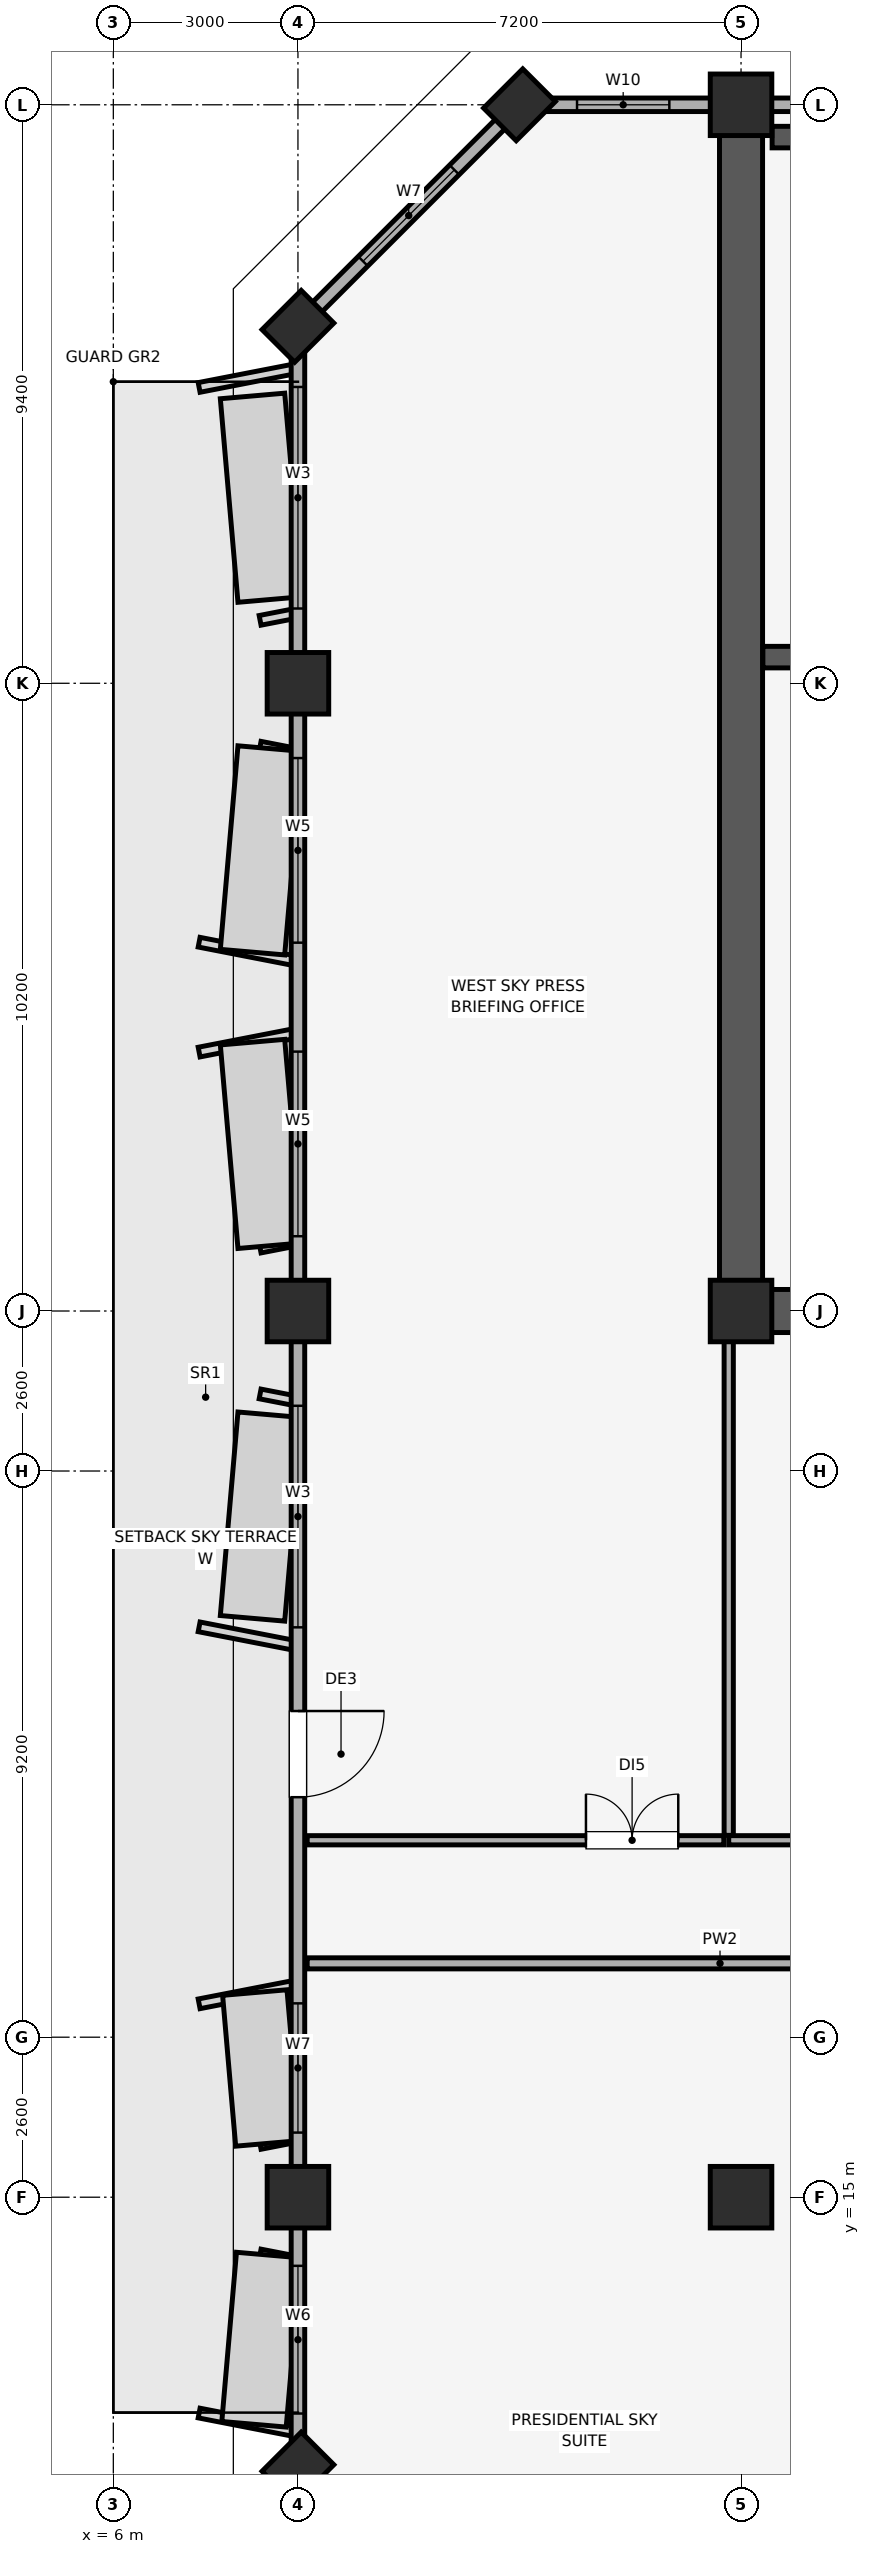
"""IFC4 building model, lengths in metres.
Left out: names, types, materials, properties, quantities, classifications, styles, units other than length and angle.
Written with IfcOpenShell. Run it as: python <this file> out.ifc"""

import sys

from ifc_helpers import new_model, si_unit, direction, frame, frame_2d, origin, origin_2d, place, context, subcontext, project, spatial, rectangle, extrude, element, fill, save


model = new_model("IFC4")
c1 = context("Model", 3, precision=1e-05, world=origin(), true_north=direction((0.0, 1.0)))
c2 = subcontext(c1, "Body", "Model", "MODEL_VIEW")
j1 = project(units=[si_unit("LENGTHUNIT", "METRE"), si_unit("PLANEANGLEUNIT", "RADIAN")], contexts=[c1])
p1 = place(None, origin())
s1 = spatial("IfcSite", under=j1, at=p1, CompositionType="ELEMENT")
p2 = place(p1, origin())
s2 = spatial("IfcBuilding", under=s1, at=p2, CompositionType="ELEMENT")
p3 = place(p2, frame((0.0, 0.0, 285.9)))
s3 = spatial("IfcBuildingStorey", under=s2, at=p3, CompositionType="ELEMENT", Elevation=285.9)
for number, where, z_axis, x_axis in (
    (1, (9.0, 15.0, 0.0), (0.0, 0.0, 1.0), (1.0, 0.0, 0.0)),
    (2, (9.0, 29.4, 0.0), (0.0, 0.0, 1.0), (1.0, 0.0, 0.0)),
    (3, (9.0, 39.6, 0.0), (0.0, 0.0, 1.0), (1.0, 0.0, 0.0)),
):
    element("IfcColumn", number, at=place(p3, frame(where, z_axis=z_axis, x_axis=x_axis)), inside=s3, PredefinedType="COLUMN", context=c2, shape_type="SweptSolid", body=[
        extrude(rectangle(XDim=1.0, YDim=1.0, at=origin_2d()), origin(), (0.0, 0.0, 1.0), 4.1),
    ])
for number, where, z_axis, x_axis in (
    (4, (12.6, 49.0, 0.0), (0.0, 0.0, 1.0), (0.707, 0.707, 0.0)),
    (5, (9.0, 45.4, 0.0), (0.0, 0.0, 1.0), (0.707, 0.707, 0.0)),
    (6, (9.0, 10.6, 0.0), (0.0, 0.0, 1.0), (0.707, 0.707, 0.0)),
):
    element("IfcColumn", number, at=place(p3, frame(where, z_axis=z_axis, x_axis=x_axis)), inside=s3, PredefinedType="PILASTER", context=c2, shape_type="SweptSolid", body=[
        extrude(rectangle(XDim=0.9, YDim=0.75, at=origin_2d()), origin(), (0.0, 0.0, 1.0), 4.1),
    ])
for number, where, z_axis, x_axis in (
    (7, (16.2, 15.0, 0.0), (0.0, 0.0, 1.0), (1.0, 0.0, 0.0)),
    (8, (16.2, 29.4, 0.0), (0.0, 0.0, 1.0), (1.0, 0.0, 0.0)),
    (9, (16.2, 49.0, 0.0), (0.0, 0.0, 1.0), (1.0, 0.0, 0.0)),
):
    element("IfcColumn", number, at=place(p3, frame(where, z_axis=z_axis, x_axis=x_axis)), inside=s3, PredefinedType="COLUMN", context=c2, shape_type="SweptSolid", body=[
        extrude(rectangle(XDim=1.0, YDim=1.0, at=origin_2d()), origin(), (0.0, 0.0, 1.0), 4.1),
    ])
p4 = place(p3, frame((71.4, 49.0, 0.0), z_axis=(0.0, 0.0, 1.0), x_axis=(-1.0, 0.0, 0.0)))
e10 = element("IfcWall", 10, at=p4, inside=s3, PredefinedType="SOLIDWALL", context=c2, shape_type="SweptSolid", body=[
    extrude(rectangle(XDim=58.8, YDim=0.22, at=frame_2d((29.4, 0.0))), origin(), (0.0, 0.0, 1.0), 3.3),
])
p5 = place(p4, frame((56.365, 0.0, 0.85)))
e11 = element("IfcOpeningElement", 11, at=p5, cuts=e10, PredefinedType="OPENING", context=c2, shape_type="SweptSolid", body=[
    extrude(rectangle(XDim=1.5, YDim=1.4, at=frame_2d((0.75, 0.7))), frame((0.0, 0.12, 0.0), z_axis=(0.0, -1.0, 0.0), x_axis=(1.0, 0.0, 0.0)), (0.0, 0.0, 1.0), 0.24),
])
p6 = place(p4, frame((0.935, 0.0, 0.85)))
e12 = element("IfcOpeningElement", 12, at=p6, cuts=e10, PredefinedType="OPENING", context=c2, shape_type="SweptSolid", body=[
    extrude(rectangle(XDim=1.5, YDim=1.4, at=frame_2d((0.75, 0.7))), frame((0.0, 0.12, 0.0), z_axis=(0.0, -1.0, 0.0), x_axis=(1.0, 0.0, 0.0)), (0.0, 0.0, 1.0), 0.24),
])
p7 = place(p4, frame((41.915, 0.0, 0.9)))
e13 = element("IfcOpeningElement", 13, at=p7, cuts=e10, PredefinedType="OPENING", context=c2, shape_type="SweptSolid", body=[
    extrude(rectangle(XDim=3.6, YDim=1.5, at=frame_2d((1.8, 0.75))), frame((0.0, 0.12, 0.0), z_axis=(0.0, -1.0, 0.0), x_axis=(1.0, 0.0, 0.0)), (0.0, 0.0, 1.0), 0.24),
])
p8 = place(p4, frame((36.85, 0.0, 0.9)))
e14 = element("IfcOpeningElement", 14, at=p8, cuts=e10, PredefinedType="OPENING", context=c2, shape_type="SweptSolid", body=[
    extrude(rectangle(XDim=3.0, YDim=1.5, at=frame_2d((1.5, 0.75))), frame((0.0, 0.12, 0.0), z_axis=(0.0, -1.0, 0.0), x_axis=(1.0, 0.0, 0.0)), (0.0, 0.0, 1.0), 0.24),
])
p9 = place(p4, frame((19.7, 0.0, 0.9)))
e15 = element("IfcOpeningElement", 15, at=p9, cuts=e10, PredefinedType="OPENING", context=c2, shape_type="SweptSolid", body=[
    extrude(rectangle(XDim=3.6, YDim=1.5, at=frame_2d((1.8, 0.75))), frame((0.0, 0.12, 0.0), z_axis=(0.0, -1.0, 0.0), x_axis=(1.0, 0.0, 0.0)), (0.0, 0.0, 1.0), 0.24),
])
p10 = place(p4, frame((14.635, 0.0, 0.9)))
e16 = element("IfcOpeningElement", 16, at=p10, cuts=e10, PredefinedType="OPENING", context=c2, shape_type="SweptSolid", body=[
    extrude(rectangle(XDim=2.4, YDim=1.5, at=frame_2d((1.2, 0.75))), frame((0.0, 0.12, 0.0), z_axis=(0.0, -1.0, 0.0), x_axis=(1.0, 0.0, 0.0)), (0.0, 0.0, 1.0), 0.24),
])
p11 = place(p3, frame((12.6, 49.0, 0.0), z_axis=(0.0, 0.0, 1.0), x_axis=(-0.707106781187, -0.707106781187, 0.0)))
e17 = element("IfcWall", 17, at=p11, inside=s3, PredefinedType="SOLIDWALL", context=c2, shape_type="SweptSolid", body=[
    extrude(rectangle(XDim=5.091, YDim=0.22, at=frame_2d((2.546, 0.0))), origin(), (0.0, 0.0, 1.0), 3.3),
])
p12 = place(p11, frame((1.496, 0.0, 0.85)))
e18 = element("IfcOpeningElement", 18, at=p12, cuts=e17, PredefinedType="OPENING", context=c2, shape_type="SweptSolid", body=[
    extrude(rectangle(XDim=2.1, YDim=1.6, at=frame_2d((1.05, 0.8))), frame((0.0, 0.12, 0.0), z_axis=(0.0, -1.0, 0.0), x_axis=(1.0, 0.0, 0.0)), (0.0, 0.0, 1.0), 0.24),
])
p13 = place(p3, frame((9.0, 45.4, 0.0), z_axis=(0.0, 0.0, 1.0), x_axis=(0.0, -1.0, 0.0)))
e19 = element("IfcWall", 19, at=p13, inside=s3, PredefinedType="SOLIDWALL", context=c2, shape_type="SweptSolid", body=[
    extrude(rectangle(XDim=34.8, YDim=0.22, at=frame_2d((17.4, 0.0))), origin(), (0.0, 0.0, 1.0), 3.3),
])
p14 = place(p13, frame((22.5, 0.0, 0.0)))
e20 = element("IfcOpeningElement", 20, at=p14, cuts=e19, PredefinedType="OPENING", context=c2, shape_type="SweptSolid", body=[
    extrude(rectangle(XDim=1.4, YDim=2.2, at=frame_2d((0.7, 1.1))), frame((0.0, 0.12, 0.0), z_axis=(0.0, -1.0, 0.0), x_axis=(1.0, 0.0, 0.0)), (0.0, 0.0, 1.0), 0.24),
])
p15 = place(p13, frame((31.515, 0.0, 0.85)))
e21 = element("IfcOpeningElement", 21, at=p15, cuts=e19, PredefinedType="OPENING", context=c2, shape_type="SweptSolid", body=[
    extrude(rectangle(XDim=2.4, YDim=1.5, at=frame_2d((1.2, 0.75))), frame((0.0, 0.12, 0.0), z_axis=(0.0, -1.0, 0.0), x_axis=(1.0, 0.0, 0.0)), (0.0, 0.0, 1.0), 0.24),
])
p16 = place(p13, frame((27.25, 0.0, 0.85)))
e22 = element("IfcOpeningElement", 22, at=p16, cuts=e19, PredefinedType="OPENING", context=c2, shape_type="SweptSolid", body=[
    extrude(rectangle(XDim=2.1, YDim=1.6, at=frame_2d((1.05, 0.8))), frame((0.0, 0.12, 0.0), z_axis=(0.0, -1.0, 0.0), x_axis=(1.0, 0.0, 0.0)), (0.0, 0.0, 1.0), 0.24),
])
p17 = place(p13, frame((17.54, 0.0, 0.85)))
e23 = element("IfcOpeningElement", 23, at=p17, cuts=e19, PredefinedType="OPENING", context=c2, shape_type="SweptSolid", body=[
    extrude(rectangle(XDim=3.6, YDim=1.65, at=frame_2d((1.8, 0.825))), frame((0.0, 0.12, 0.0), z_axis=(0.0, -1.0, 0.0), x_axis=(1.0, 0.0, 0.0)), (0.0, 0.0, 1.0), 0.24),
])
p18 = place(p13, frame((11.785, 0.0, 0.85)))
e24 = element("IfcOpeningElement", 24, at=p18, cuts=e19, PredefinedType="OPENING", context=c2, shape_type="SweptSolid", body=[
    extrude(rectangle(XDim=3.0, YDim=1.5, at=frame_2d((1.5, 0.75))), frame((0.0, 0.12, 0.0), z_axis=(0.0, -1.0, 0.0), x_axis=(1.0, 0.0, 0.0)), (0.0, 0.0, 1.0), 0.24),
])
p19 = place(p13, frame((7.015, 0.0, 0.85)))
e25 = element("IfcOpeningElement", 25, at=p19, cuts=e19, PredefinedType="OPENING", context=c2, shape_type="SweptSolid", body=[
    extrude(rectangle(XDim=3.0, YDim=1.5, at=frame_2d((1.5, 0.75))), frame((0.0, 0.12, 0.0), z_axis=(0.0, -1.0, 0.0), x_axis=(1.0, 0.0, 0.0)), (0.0, 0.0, 1.0), 0.24),
])
p20 = place(p13, frame((0.985, 0.0, 0.85)))
e26 = element("IfcOpeningElement", 26, at=p20, cuts=e19, PredefinedType="OPENING", context=c2, shape_type="SweptSolid", body=[
    extrude(rectangle(XDim=3.6, YDim=1.65, at=frame_2d((1.8, 0.825))), frame((0.0, 0.12, 0.0), z_axis=(0.0, -1.0, 0.0), x_axis=(1.0, 0.0, 0.0)), (0.0, 0.0, 1.0), 0.24),
])
p21 = place(p3, frame((9.0, 10.6, 0.0), z_axis=(0.0, 0.0, 1.0), x_axis=(0.707106781187, -0.707106781187, 0.0)))
e27 = element("IfcWall", 27, at=p21, inside=s3, PredefinedType="SOLIDWALL", context=c2, shape_type="SweptSolid", body=[
    extrude(rectangle(XDim=5.091, YDim=0.22, at=frame_2d((2.546, 0.0))), origin(), (0.0, 0.0, 1.0), 3.3),
])
p22 = place(p21, frame((1.496, 0.0, 0.85)))
e28 = element("IfcOpeningElement", 28, at=p22, cuts=e27, PredefinedType="OPENING", context=c2, shape_type="SweptSolid", body=[
    extrude(rectangle(XDim=2.1, YDim=1.6, at=frame_2d((1.05, 0.8))), frame((0.0, 0.12, 0.0), z_axis=(0.0, -1.0, 0.0), x_axis=(1.0, 0.0, 0.0)), (0.0, 0.0, 1.0), 0.24),
])
p23 = place(p3, frame((16.2, 29.4, 0.0), z_axis=(0.0, 0.0, 1.0), x_axis=(0.0, 1.0, 0.0)))
e29 = element("IfcWall", 29, at=p23, inside=s3, PredefinedType="SHEAR", context=c2, shape_type="SweptSolid", body=[
    extrude(rectangle(XDim=19.2, YDim=0.7, at=frame_2d((9.6, 0.0))), origin(), (0.0, 0.0, 1.0), 4.1),
])
p24 = place(p3, frame((16.555, 29.4, 0.0), z_axis=(0.0, 0.0, 1.0), x_axis=(1.0, 0.0, 0.0)))
e30 = element("IfcWall", 30, at=p24, inside=s3, PredefinedType="SHEAR", context=c2, shape_type="SweptSolid", body=[
    extrude(rectangle(XDim=7.045, YDim=0.7, at=frame_2d((3.522, 0.0))), origin(), (0.0, 0.0, 1.0), 4.1),
])
p25 = place(p3, frame((16.555, 40.025, 0.0), z_axis=(0.0, 0.0, 1.0), x_axis=(1.0, 0.0, 0.0)))
e31 = element("IfcWall", 31, at=p25, inside=s3, PredefinedType="SHEAR", context=c2, shape_type="SweptSolid", body=[
    extrude(rectangle(XDim=4.3, YDim=0.35, at=frame_2d((2.15, 0.0))), origin(), (0.0, 0.0, 1.0), 4.1),
])
p26 = place(p25, frame((1.91, 0.0, 0.0)))
e32 = element("IfcOpeningElement", 32, at=p26, cuts=e31, PredefinedType="OPENING", context=c2, shape_type="SweptSolid", body=[
    extrude(rectangle(XDim=1.15, YDim=2.15, at=frame_2d((0.575, 1.075))), frame((0.0, 0.185, 0.0), z_axis=(0.0, -1.0, 0.0), x_axis=(1.0, 0.0, 0.0)), (0.0, 0.0, 1.0), 0.37),
])
p27 = place(p3, frame((16.705, 48.475, 0.0), z_axis=(0.0, 0.0, 1.0), x_axis=(1.0, 0.0, 0.0)))
e33 = element("IfcWall", 33, at=p27, inside=s3, PredefinedType="SHEAR", context=c2, shape_type="SweptSolid", body=[
    extrude(rectangle(XDim=4.15, YDim=0.35, at=frame_2d((2.075, 0.0))), origin(), (0.0, 0.0, 1.0), 4.1),
])
p28 = place(p3, frame((9.15, 18.8, 0.0), z_axis=(0.0, 0.0, 1.0), x_axis=(1.0, 0.0, 0.0)))
e34 = element("IfcWall", 34, at=p28, inside=s3, PredefinedType="PARTITIONING", context=c2, shape_type="SweptSolid", body=[
    extrude(rectangle(XDim=13.417, YDim=0.18, at=frame_2d((6.708, 0.0))), origin(), (0.0, 0.0, 1.0), 4.1),
])
p29 = place(p28, frame((8.423, 0.0, 0.0)))
e35 = element("IfcOpeningElement", 35, at=p29, cuts=e34, PredefinedType="OPENING", context=c2, shape_type="SweptSolid", body=[
    extrude(rectangle(XDim=1.0, YDim=2.15, at=frame_2d((0.5, 1.075))), frame((0.0, 0.1, 0.0), z_axis=(0.0, -1.0, 0.0), x_axis=(1.0, 0.0, 0.0)), (0.0, 0.0, 1.0), 0.2),
])
p30 = place(p3, frame((16.0, 20.8, 0.0), z_axis=(0.0, 0.0, 1.0), x_axis=(1.0, 0.0, 0.0)))
e36 = element("IfcWall", 36, at=p30, inside=s3, PredefinedType="PARTITIONING", context=c2, shape_type="SweptSolid", body=[
    extrude(rectangle(XDim=9.0, YDim=0.15, at=frame_2d((4.5, 0.0))), origin(), (0.0, 0.0, 1.0), 4.1),
])
p31 = place(p30, frame((4.0, 0.0, 0.0)))
e37 = element("IfcOpeningElement", 37, at=p31, cuts=e36, PredefinedType="OPENING", context=c2, shape_type="SweptSolid", body=[
    extrude(rectangle(XDim=1.0, YDim=2.15, at=frame_2d((0.5, 1.075))), frame((0.0, 0.085, 0.0), z_axis=(0.0, -1.0, 0.0), x_axis=(1.0, 0.0, 0.0)), (0.0, 0.0, 1.0), 0.17),
])
p32 = place(p3, frame((16.0, 20.88, 0.0), z_axis=(0.0, 0.0, 1.0), x_axis=(0.0, 1.0, 0.0)))
e38 = element("IfcWall", 38, at=p32, inside=s3, PredefinedType="PARTITIONING", context=c2, shape_type="SweptSolid", body=[
    extrude(rectangle(XDim=8.51, YDim=0.15, at=frame_2d((4.255, 0.0))), origin(), (0.0, 0.0, 1.0), 3.74),
])
p33 = place(p3, frame((9.15, 20.8, 0.0), z_axis=(0.0, 0.0, 1.0), x_axis=(1.0, 0.0, 0.0)))
e39 = element("IfcWall", 39, at=p33, inside=s3, PredefinedType="PARTITIONING", context=c2, shape_type="SweptSolid", body=[
    extrude(rectangle(XDim=6.77, YDim=0.15, at=frame_2d((3.385, 0.0))), origin(), (0.0, 0.0, 1.0), 4.1),
])
p34 = place(p33, frame((4.53, 0.0, 0.0)))
e40 = element("IfcOpeningElement", 40, at=p34, cuts=e39, PredefinedType="OPENING", context=c2, shape_type="SweptSolid", body=[
    extrude(rectangle(XDim=1.5, YDim=2.25, at=frame_2d((0.75, 1.125))), frame((0.0, 0.085, 0.0), z_axis=(0.0, -1.0, 0.0), x_axis=(1.0, 0.0, 0.0)), (0.0, 0.0, 1.0), 0.17),
])
p35 = place(p12, origin())
e41 = element("IfcWindow", 41, at=p35, inside=s3, PartitioningType="SINGLE_PANEL", PredefinedType="WINDOW", context=c2, shape_type="SweptSolid", body=[
    extrude(rectangle(XDim=2.1, YDim=1.6, at=frame_2d((1.05, 0.8))), frame((0.0, 0.03, 0.0), z_axis=(0.0, -1.0, 0.0), x_axis=(1.0, 0.0, 0.0)), (0.0, 0.0, 1.0), 0.06),
])
fill(e18, e41)
p36 = place(p14, origin())
e42 = element("IfcDoor", 42, at=p36, inside=s3, OperationType="SINGLE_SWING_LEFT", PredefinedType="DOOR", context=c2, shape_type="SweptSolid", body=[
    extrude(rectangle(XDim=1.4, YDim=2.2, at=frame_2d((0.7, 1.1))), frame((0.0, 0.025, 0.0), z_axis=(0.0, -1.0, 0.0), x_axis=(1.0, 0.0, 0.0)), (0.0, 0.0, 1.0), 0.05),
])
fill(e20, e42)
p37 = place(p15, origin())
e43 = element("IfcWindow", 43, at=p37, inside=s3, PartitioningType="SINGLE_PANEL", PredefinedType="WINDOW", context=c2, shape_type="SweptSolid", body=[
    extrude(rectangle(XDim=2.4, YDim=1.5, at=frame_2d((1.2, 0.75))), frame((0.0, 0.03, 0.0), z_axis=(0.0, -1.0, 0.0), x_axis=(1.0, 0.0, 0.0)), (0.0, 0.0, 1.0), 0.06),
])
fill(e21, e43)
p38 = place(p16, origin())
e44 = element("IfcWindow", 44, at=p38, inside=s3, PartitioningType="SINGLE_PANEL", PredefinedType="WINDOW", context=c2, shape_type="SweptSolid", body=[
    extrude(rectangle(XDim=2.1, YDim=1.6, at=frame_2d((1.05, 0.8))), frame((0.0, 0.03, 0.0), z_axis=(0.0, -1.0, 0.0), x_axis=(1.0, 0.0, 0.0)), (0.0, 0.0, 1.0), 0.06),
])
fill(e22, e44)
p39 = place(p17, origin())
e45 = element("IfcWindow", 45, at=p39, inside=s3, PartitioningType="SINGLE_PANEL", PredefinedType="WINDOW", context=c2, shape_type="SweptSolid", body=[
    extrude(rectangle(XDim=3.6, YDim=1.65, at=frame_2d((1.8, 0.825))), frame((0.0, 0.03, 0.0), z_axis=(0.0, -1.0, 0.0), x_axis=(1.0, 0.0, 0.0)), (0.0, 0.0, 1.0), 0.06),
])
fill(e23, e45)
p40 = place(p18, origin())
e46 = element("IfcWindow", 46, at=p40, inside=s3, PartitioningType="SINGLE_PANEL", PredefinedType="WINDOW", context=c2, shape_type="SweptSolid", body=[
    extrude(rectangle(XDim=3.0, YDim=1.5, at=frame_2d((1.5, 0.75))), frame((0.0, 0.03, 0.0), z_axis=(0.0, -1.0, 0.0), x_axis=(1.0, 0.0, 0.0)), (0.0, 0.0, 1.0), 0.06),
])
fill(e24, e46)
p41 = place(p19, origin())
e47 = element("IfcWindow", 47, at=p41, inside=s3, PartitioningType="SINGLE_PANEL", PredefinedType="WINDOW", context=c2, shape_type="SweptSolid", body=[
    extrude(rectangle(XDim=3.0, YDim=1.5, at=frame_2d((1.5, 0.75))), frame((0.0, 0.03, 0.0), z_axis=(0.0, -1.0, 0.0), x_axis=(1.0, 0.0, 0.0)), (0.0, 0.0, 1.0), 0.06),
])
fill(e25, e47)
p42 = place(p20, origin())
e48 = element("IfcWindow", 48, at=p42, inside=s3, PartitioningType="SINGLE_PANEL", PredefinedType="WINDOW", context=c2, shape_type="SweptSolid", body=[
    extrude(rectangle(XDim=3.6, YDim=1.65, at=frame_2d((1.8, 0.825))), frame((0.0, 0.03, 0.0), z_axis=(0.0, -1.0, 0.0), x_axis=(1.0, 0.0, 0.0)), (0.0, 0.0, 1.0), 0.06),
])
fill(e26, e48)
p43 = place(p5, origin())
e49 = element("IfcWindow", 49, at=p43, inside=s3, PartitioningType="SINGLE_PANEL", PredefinedType="WINDOW", context=c2, shape_type="SweptSolid", body=[
    extrude(rectangle(XDim=1.5, YDim=1.4, at=frame_2d((0.75, 0.7))), frame((0.0, 0.03, 0.0), z_axis=(0.0, -1.0, 0.0), x_axis=(1.0, 0.0, 0.0)), (0.0, 0.0, 1.0), 0.06),
])
fill(e11, e49)
p44 = place(p34, origin())
e50 = element("IfcDoor", 50, at=p44, inside=s3, OperationType="DOUBLE_DOOR_SINGLE_SWING", PredefinedType="DOOR", context=c2, shape_type="SweptSolid", body=[
    extrude(rectangle(XDim=1.5, YDim=2.25, at=frame_2d((0.75, 1.125))), frame((0.0, 0.025, 0.0), z_axis=(0.0, -1.0, 0.0), x_axis=(1.0, 0.0, 0.0)), (0.0, 0.0, 1.0), 0.05),
])
fill(e40, e50)
save(model, sys.argv[1])
